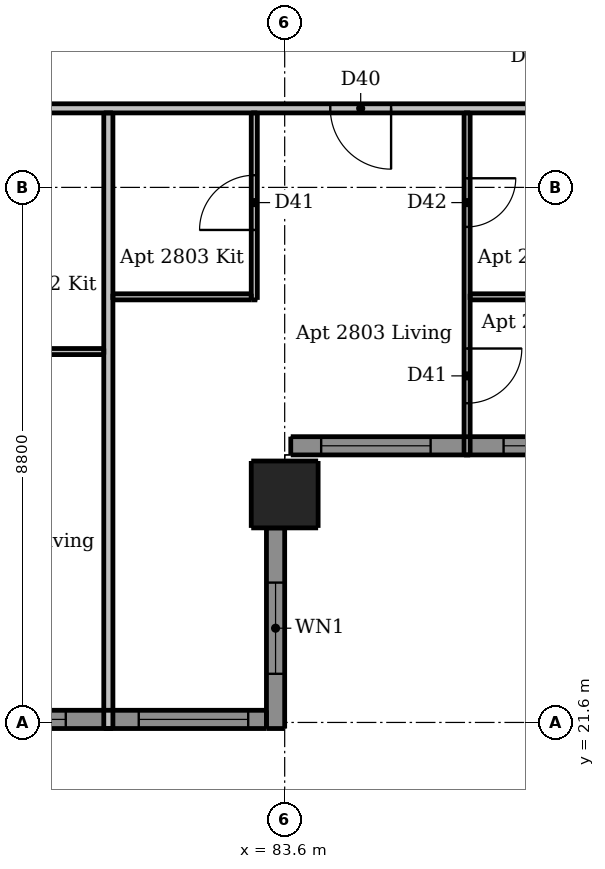
"""IFC4 building model, lengths in metres.
Left out: names, types, materials, properties, quantities, classifications, styles, units other than length and angle.
Written with IfcOpenShell. Run it as: python <this file> out.ifc"""

import sys

from ifc_helpers import new_model, si_unit, direction, frame, frame_2d, origin, origin_2d, place, context, subcontext, project, spatial, rectangle, extrude, element, fill, save


model = new_model("IFC4")
c1 = context("Model", 3, precision=1e-05, world=origin(), true_north=direction((0.0, 1.0)))
c2 = subcontext(c1, "Body", "Model", "MODEL_VIEW")
j1 = project(units=[si_unit("LENGTHUNIT", "METRE"), si_unit("PLANEANGLEUNIT", "RADIAN")], contexts=[c1])
p1 = place(None, origin())
s1 = spatial("IfcSite", under=j1, at=p1, CompositionType="ELEMENT")
p2 = place(p1, origin())
s2 = spatial("IfcBuilding", under=s1, at=p2, CompositionType="ELEMENT")
p3 = place(p2, frame((0.0, 0.0, 105.1)))
s3 = spatial("IfcBuildingStorey", under=s2, at=p3, CompositionType="ELEMENT", Elevation=105.1)
p4 = place(p3, frame((83.6, 25.35, 0.0), z_axis=(0.0, 0.0, 1.0), x_axis=(1.0, 0.0, 0.0)))
e1 = element("IfcColumn", 1, at=p4, inside=s3, PredefinedType="COLUMN", context=c2, shape_type="SweptSolid", body=[
    extrude(rectangle(XDim=1.1, YDim=1.1, at=origin_2d()), origin(), (0.0, 0.0, 1.0), 3.05),
])
p5 = place(p3, frame((83.45, 21.5, 0.0), z_axis=(0.0, 0.0, 1.0), x_axis=(0.0, 1.0, 0.0)))
e2 = element("IfcWall", 2, at=p5, inside=s3, PredefinedType="SOLIDWALL", context=c2, shape_type="SweptSolid", body=[
    extrude(rectangle(XDim=3.3, YDim=0.3, at=frame_2d((1.65, 0.0))), origin(), (0.0, 0.0, 1.0), 3.05),
])
p6 = place(p5, frame((0.9, 0.0, 0.9)))
e3 = element("IfcOpeningElement", 3, at=p6, cuts=e2, PredefinedType="OPENING", context=c2, shape_type="SweptSolid", body=[
    extrude(rectangle(XDim=1.5, YDim=1.5, at=frame_2d((0.75, 0.75))), frame((0.0, 0.16, 0.0), z_axis=(0.0, -1.0, 0.0), x_axis=(1.0, 0.0, 0.0)), (0.0, 0.0, 1.0), 0.32),
])
p7 = place(p3, frame((77.6, 21.65, 0.0), z_axis=(0.0, 0.0, 1.0), x_axis=(1.0, 0.0, 0.0)))
e4 = element("IfcWall", 4, at=p7, inside=s3, PredefinedType="SOLIDWALL", context=c2, shape_type="SweptSolid", body=[
    extrude(rectangle(XDim=5.7, YDim=0.3, at=frame_2d((2.85, 0.0))), origin(), (0.0, 0.0, 1.0), 3.05),
])
p8 = place(p7, frame((0.6, 0.0, 0.15)))
e5 = element("IfcOpeningElement", 5, at=p8, cuts=e4, PredefinedType="OPENING", context=c2, shape_type="SweptSolid", body=[
    extrude(rectangle(XDim=1.8, YDim=2.1, at=frame_2d((0.9, 1.05))), frame((0.0, 0.16, 0.0), z_axis=(0.0, -1.0, 0.0), x_axis=(1.0, 0.0, 0.0)), (0.0, 0.0, 1.0), 0.32),
])
p9 = place(p7, frame((3.6, 0.0, 0.15)))
e6 = element("IfcOpeningElement", 6, at=p9, cuts=e4, PredefinedType="OPENING", context=c2, shape_type="SweptSolid", body=[
    extrude(rectangle(XDim=1.8, YDim=2.1, at=frame_2d((0.9, 1.05))), frame((0.0, 0.16, 0.0), z_axis=(0.0, -1.0, 0.0), x_axis=(1.0, 0.0, 0.0)), (0.0, 0.0, 1.0), 0.32),
])
p10 = place(p3, frame((83.7, 26.15, 0.0), z_axis=(0.0, 0.0, 1.0), x_axis=(1.0, 0.0, 0.0)))
e7 = element("IfcWall", 7, at=p10, inside=s3, PredefinedType="SOLIDWALL", context=c2, shape_type="SweptSolid", body=[
    extrude(rectangle(XDim=5.79, YDim=0.3, at=frame_2d((2.895, 0.0))), origin(), (0.0, 0.0, 1.0), 3.05),
])
p11 = place(p10, frame((0.5, 0.0, 0.15)))
e8 = element("IfcOpeningElement", 8, at=p11, cuts=e7, PredefinedType="OPENING", context=c2, shape_type="SweptSolid", body=[
    extrude(rectangle(XDim=1.8, YDim=2.1, at=frame_2d((0.9, 1.05))), frame((0.0, 0.16, 0.0), z_axis=(0.0, -1.0, 0.0), x_axis=(1.0, 0.0, 0.0)), (0.0, 0.0, 1.0), 0.32),
])
p12 = place(p10, frame((3.5, 0.0, 0.15)))
e9 = element("IfcOpeningElement", 9, at=p12, cuts=e7, PredefinedType="OPENING", context=c2, shape_type="SweptSolid", body=[
    extrude(rectangle(XDim=1.8, YDim=2.1, at=frame_2d((0.9, 1.05))), frame((0.0, 0.16, 0.0), z_axis=(0.0, -1.0, 0.0), x_axis=(1.0, 0.0, 0.0)), (0.0, 0.0, 1.0), 0.32),
])
p13 = place(p3, frame((83.1, 28.55, 0.0), z_axis=(0.0, 0.0, 1.0), x_axis=(0.0, 1.0, 0.0)))
e10 = element("IfcWall", 10, at=p13, inside=s3, PredefinedType="PARTITIONING", context=c2, shape_type="SweptSolid", body=[
    extrude(rectangle(XDim=3.075, YDim=0.1, at=frame_2d((1.538, 0.0))), origin(), (0.0, 0.0, 1.0), 3.05),
])
p14 = place(p13, frame((1.15, 0.0, 0.0)))
e11 = element("IfcOpeningElement", 11, at=p14, cuts=e10, PredefinedType="OPENING", context=c2, shape_type="SweptSolid", body=[
    extrude(rectangle(XDim=0.9, YDim=2.1, at=frame_2d((0.45, 1.05))), frame((0.0, 0.06, 0.0), z_axis=(0.0, -1.0, 0.0), x_axis=(1.0, 0.0, 0.0)), (0.0, 0.0, 1.0), 0.12),
])
p15 = place(p3, frame((86.6, 31.625, 0.0), z_axis=(0.0, 0.0, 1.0), x_axis=(0.0, -1.0, 0.0)))
e12 = element("IfcWall", 12, at=p15, inside=s3, PredefinedType="PARTITIONING", context=c2, shape_type="SweptSolid", body=[
    extrude(rectangle(XDim=5.625, YDim=0.1, at=frame_2d((2.812, 0.0))), origin(), (0.0, 0.0, 1.0), 3.05),
])
p16 = place(p15, frame((3.875, 0.0, 0.0)))
e13 = element("IfcOpeningElement", 13, at=p16, cuts=e12, PredefinedType="OPENING", context=c2, shape_type="SweptSolid", body=[
    extrude(rectangle(XDim=0.9, YDim=2.1, at=frame_2d((0.45, 1.05))), frame((0.0, 0.06, 0.0), z_axis=(0.0, -1.0, 0.0), x_axis=(1.0, 0.0, 0.0)), (0.0, 0.0, 1.0), 0.12),
])
p17 = place(p15, frame((1.075, 0.0, 0.0)))
e14 = element("IfcOpeningElement", 14, at=p17, cuts=e12, PredefinedType="OPENING", context=c2, shape_type="SweptSolid", body=[
    extrude(rectangle(XDim=0.8, YDim=2.1, at=frame_2d((0.4, 1.05))), frame((0.0, 0.06, 0.0), z_axis=(0.0, -1.0, 0.0), x_axis=(1.0, 0.0, 0.0)), (0.0, 0.0, 1.0), 0.12),
])
p18 = place(p3, frame((80.775, 28.6, 0.0), z_axis=(0.0, 0.0, 1.0), x_axis=(1.0, 0.0, 0.0)))
e15 = element("IfcWall", 15, at=p18, inside=s3, PredefinedType="PARTITIONING", context=c2, shape_type="SweptSolid", body=[
    extrude(rectangle(XDim=2.275, YDim=0.1, at=frame_2d((1.138, 0.0))), origin(), (0.0, 0.0, 1.0), 3.05),
])
p19 = place(p3, frame((86.65, 28.6, 0.0), z_axis=(0.0, 0.0, 1.0), x_axis=(1.0, 0.0, 0.0)))
e16 = element("IfcWall", 16, at=p19, inside=s3, PredefinedType="PARTITIONING", context=c2, shape_type="SweptSolid", body=[
    extrude(rectangle(XDim=2.875, YDim=0.1, at=frame_2d((1.438, 0.0))), origin(), (0.0, 0.0, 1.0), 3.05),
])
p20 = place(p3, frame((78.35, 27.7, 0.0), z_axis=(0.0, 0.0, 1.0), x_axis=(1.0, 0.0, 0.0)))
e17 = element("IfcWall", 17, at=p20, inside=s3, PredefinedType="PARTITIONING", context=c2, shape_type="SweptSolid", body=[
    extrude(rectangle(XDim=2.275, YDim=0.1, at=frame_2d((1.137, 0.0))), origin(), (0.0, 0.0, 1.0), 3.05),
])
p21 = place(p3, frame((80.7, 21.5, 0.0), z_axis=(0.0, 0.0, 1.0), x_axis=(0.0, 1.0, 0.0)))
e18 = element("IfcWall", 18, at=p21, inside=s3, PredefinedType="PARTITIONING", context=c2, shape_type="SweptSolid", body=[
    extrude(rectangle(XDim=10.125, YDim=0.15, at=frame_2d((5.062, 0.0))), origin(), (0.0, 0.0, 1.0), 3.05),
])
p22 = place(p3, frame((89.525, 31.7, 0.0), z_axis=(0.0, 0.0, 1.0), x_axis=(-1.0, 0.0, 0.0)))
e19 = element("IfcWall", 19, at=p22, inside=s3, PredefinedType="PARTITIONING", context=c2, shape_type="SweptSolid", body=[
    extrude(rectangle(XDim=28.75, YDim=0.15, at=frame_2d((14.375, 0.0))), origin(), (0.0, 0.0, 1.0), 3.05),
])
p23 = place(p22, frame((25.875, 0.0, 0.0)))
e20 = element("IfcOpeningElement", 20, at=p23, cuts=e19, PredefinedType="OPENING", context=c2, shape_type="SweptSolid", body=[
    extrude(rectangle(XDim=1.0, YDim=2.1, at=frame_2d((0.5, 1.05))), frame((0.0, 0.085, 0.0), z_axis=(0.0, -1.0, 0.0), x_axis=(1.0, 0.0, 0.0)), (0.0, 0.0, 1.0), 0.17),
])
p24 = place(p22, frame((12.525, 0.0, 0.0)))
e21 = element("IfcOpeningElement", 21, at=p24, cuts=e19, PredefinedType="OPENING", context=c2, shape_type="SweptSolid", body=[
    extrude(rectangle(XDim=1.0, YDim=2.1, at=frame_2d((0.5, 1.05))), frame((0.0, 0.085, 0.0), z_axis=(0.0, -1.0, 0.0), x_axis=(1.0, 0.0, 0.0)), (0.0, 0.0, 1.0), 0.17),
])
p25 = place(p22, frame((4.175, 0.0, 0.0)))
e22 = element("IfcOpeningElement", 22, at=p25, cuts=e19, PredefinedType="OPENING", context=c2, shape_type="SweptSolid", body=[
    extrude(rectangle(XDim=1.0, YDim=2.1, at=frame_2d((0.5, 1.05))), frame((0.0, 0.085, 0.0), z_axis=(0.0, -1.0, 0.0), x_axis=(1.0, 0.0, 0.0)), (0.0, 0.0, 1.0), 0.17),
])
p26 = place(p6, origin())
e23 = element("IfcWindow", 23, at=p26, inside=s3, PartitioningType="DOUBLE_PANEL_VERTICAL", PredefinedType="WINDOW", context=c2, shape_type="SweptSolid", body=[
    extrude(rectangle(XDim=1.5, YDim=1.5, at=frame_2d((0.75, 0.75))), frame((0.0, 0.03, 0.0), z_axis=(0.0, -1.0, 0.0), x_axis=(1.0, 0.0, 0.0)), (0.0, 0.0, 1.0), 0.06),
])
fill(e3, e23)
p27 = place(p8, origin())
e24 = element("IfcWindow", 24, at=p27, inside=s3, PartitioningType="DOUBLE_PANEL_VERTICAL", PredefinedType="WINDOW", context=c2, shape_type="SweptSolid", body=[
    extrude(rectangle(XDim=1.8, YDim=2.1, at=frame_2d((0.9, 1.05))), frame((0.0, 0.03, 0.0), z_axis=(0.0, -1.0, 0.0), x_axis=(1.0, 0.0, 0.0)), (0.0, 0.0, 1.0), 0.06),
])
fill(e5, e24)
p28 = place(p9, origin())
e25 = element("IfcWindow", 25, at=p28, inside=s3, PartitioningType="DOUBLE_PANEL_VERTICAL", PredefinedType="WINDOW", context=c2, shape_type="SweptSolid", body=[
    extrude(rectangle(XDim=1.8, YDim=2.1, at=frame_2d((0.9, 1.05))), frame((0.0, 0.03, 0.0), z_axis=(0.0, -1.0, 0.0), x_axis=(1.0, 0.0, 0.0)), (0.0, 0.0, 1.0), 0.06),
])
fill(e6, e25)
p29 = place(p11, origin())
e26 = element("IfcWindow", 26, at=p29, inside=s3, PartitioningType="DOUBLE_PANEL_VERTICAL", PredefinedType="WINDOW", context=c2, shape_type="SweptSolid", body=[
    extrude(rectangle(XDim=1.8, YDim=2.1, at=frame_2d((0.9, 1.05))), frame((0.0, 0.03, 0.0), z_axis=(0.0, -1.0, 0.0), x_axis=(1.0, 0.0, 0.0)), (0.0, 0.0, 1.0), 0.06),
])
fill(e8, e26)
p30 = place(p12, origin())
e27 = element("IfcWindow", 27, at=p30, inside=s3, PartitioningType="DOUBLE_PANEL_VERTICAL", PredefinedType="WINDOW", context=c2, shape_type="SweptSolid", body=[
    extrude(rectangle(XDim=1.8, YDim=2.1, at=frame_2d((0.9, 1.05))), frame((0.0, 0.03, 0.0), z_axis=(0.0, -1.0, 0.0), x_axis=(1.0, 0.0, 0.0)), (0.0, 0.0, 1.0), 0.06),
])
fill(e9, e27)
p31 = place(p25, origin())
e28 = element("IfcDoor", 28, at=p31, inside=s3, OperationType="SINGLE_SWING_LEFT", PredefinedType="DOOR", context=c2, shape_type="SweptSolid", body=[
    extrude(rectangle(XDim=1.0, YDim=2.1, at=frame_2d((0.5, 1.05))), frame((0.0, 0.025, 0.0), z_axis=(0.0, -1.0, 0.0), x_axis=(1.0, 0.0, 0.0)), (0.0, 0.0, 1.0), 0.05),
])
fill(e22, e28)
p32 = place(p14, origin())
e29 = element("IfcDoor", 29, at=p32, inside=s3, OperationType="SINGLE_SWING_LEFT", PredefinedType="DOOR", context=c2, shape_type="SweptSolid", body=[
    extrude(rectangle(XDim=0.9, YDim=2.1, at=frame_2d((0.45, 1.05))), frame((0.0, 0.025, 0.0), z_axis=(0.0, -1.0, 0.0), x_axis=(1.0, 0.0, 0.0)), (0.0, 0.0, 1.0), 0.05),
])
fill(e11, e29)
p33 = place(p16, origin())
e30 = element("IfcDoor", 30, at=p33, inside=s3, OperationType="SINGLE_SWING_LEFT", PredefinedType="DOOR", context=c2, shape_type="SweptSolid", body=[
    extrude(rectangle(XDim=0.9, YDim=2.1, at=frame_2d((0.45, 1.05))), frame((0.0, 0.025, 0.0), z_axis=(0.0, -1.0, 0.0), x_axis=(1.0, 0.0, 0.0)), (0.0, 0.0, 1.0), 0.05),
])
fill(e13, e30)
p34 = place(p17, origin())
e31 = element("IfcDoor", 31, at=p34, inside=s3, OperationType="SINGLE_SWING_LEFT", PredefinedType="DOOR", context=c2, shape_type="SweptSolid", body=[
    extrude(rectangle(XDim=0.8, YDim=2.1, at=frame_2d((0.4, 1.05))), frame((0.0, 0.025, 0.0), z_axis=(0.0, -1.0, 0.0), x_axis=(1.0, 0.0, 0.0)), (0.0, 0.0, 1.0), 0.05),
])
fill(e14, e31)
save(model, sys.argv[1])
